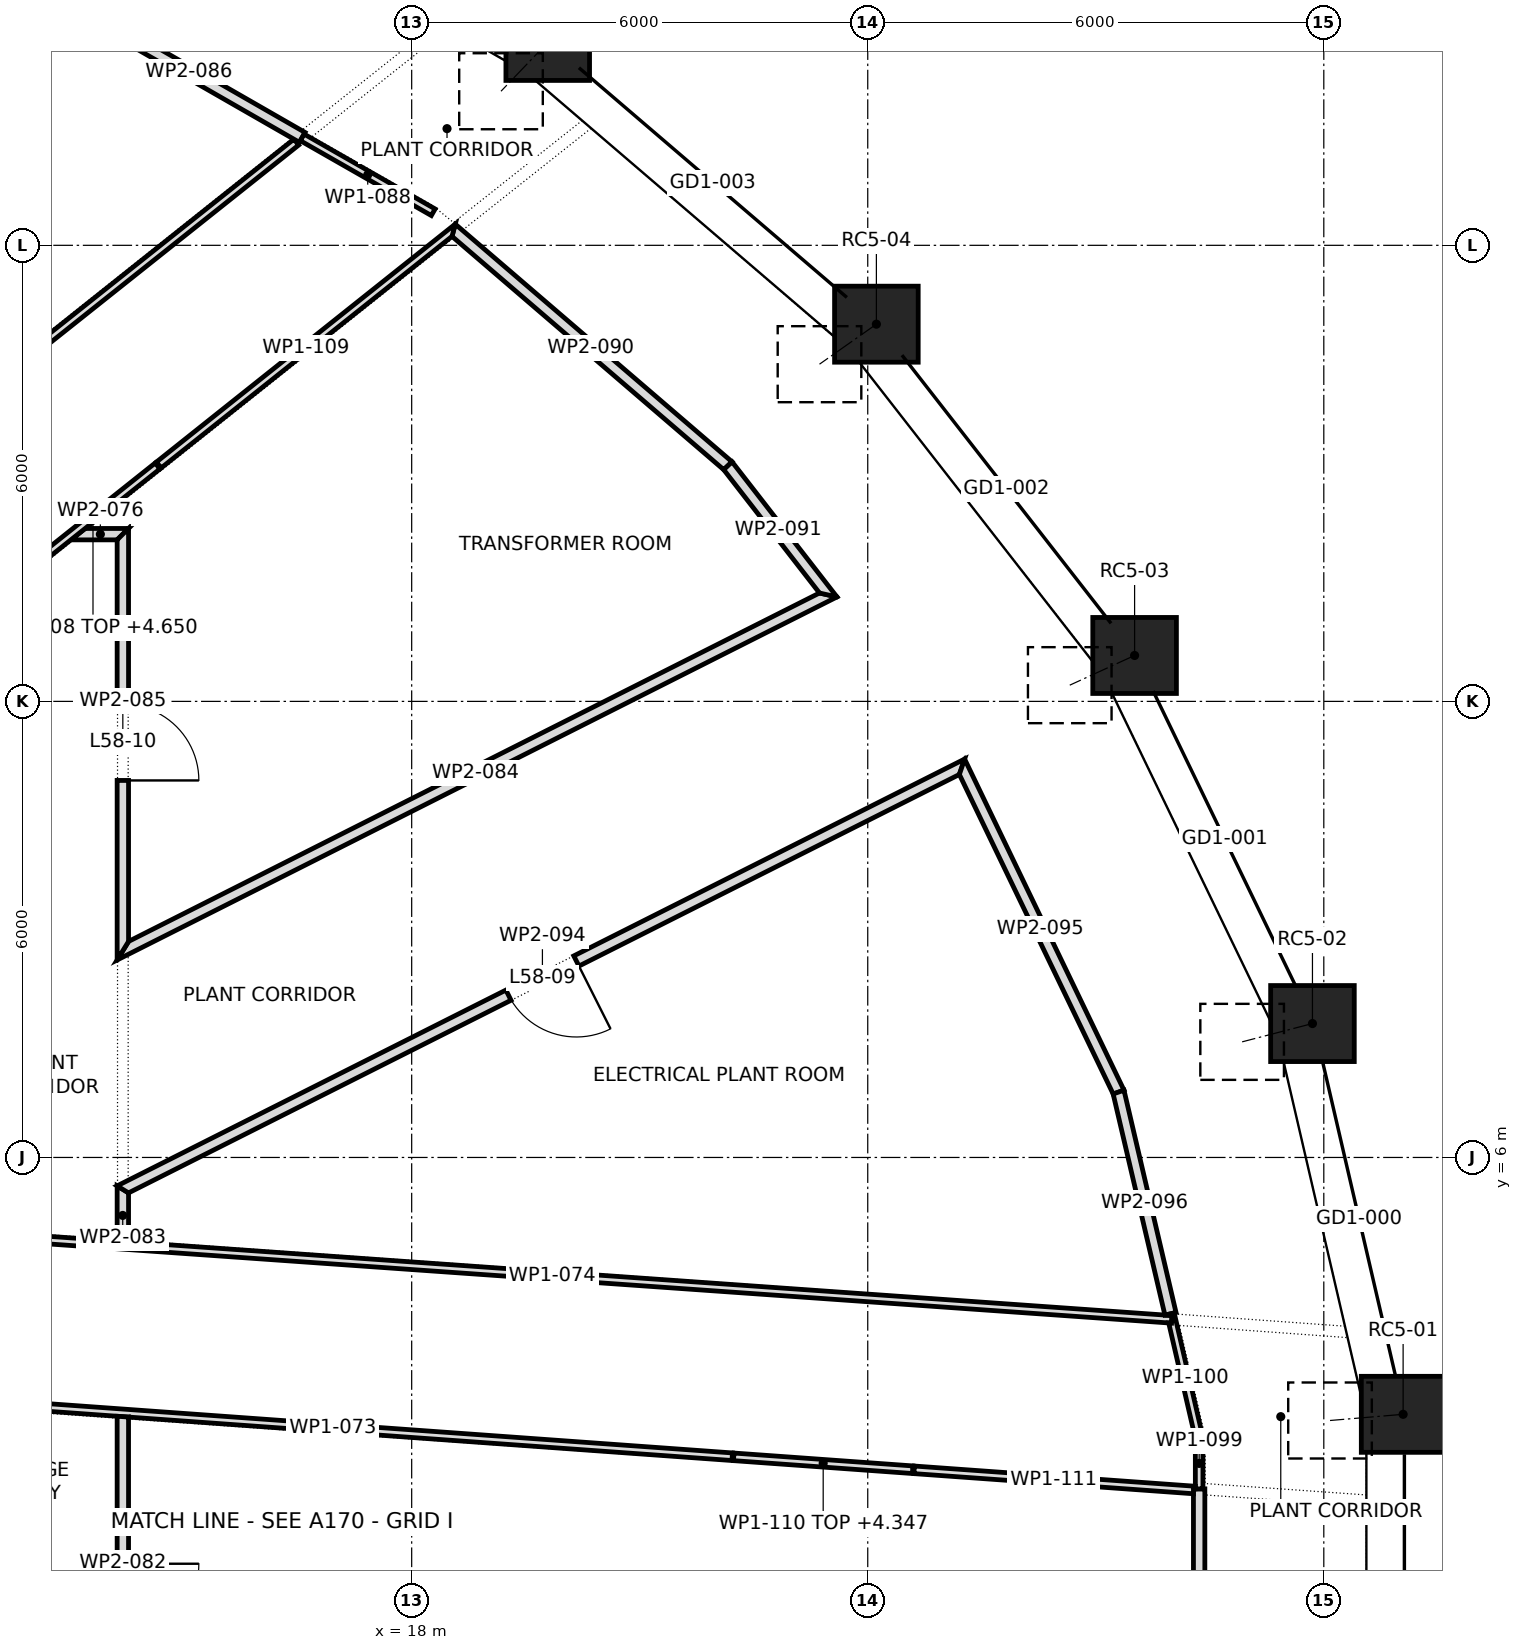
"""IFC4 building model, lengths in metres.
Left out: names, types, materials, properties, quantities, classifications, styles, units other than length and angle.
Written with IfcOpenShell. Run it as: python <this file> out.ifc"""

import sys

from ifc_helpers import new_model, si_unit, direction, frame, frame_2d, origin, origin_2d, place, context, subcontext, project, spatial, polyline, rectangle, outline, extrude, element, fill, save


model = new_model("IFC4")
c1 = context("Model", 3, precision=1e-05, world=origin(), true_north=direction((0.0, 1.0)))
c2 = subcontext(c1, "Body", "Model", "MODEL_VIEW")
j1 = project(units=[si_unit("LENGTHUNIT", "METRE"), si_unit("PLANEANGLEUNIT", "RADIAN")], contexts=[c1])
p1 = place(None, origin())
s1 = spatial("IfcSite", under=j1, at=p1, CompositionType="ELEMENT")
p2 = place(p1, origin())
s2 = spatial("IfcBuilding", under=s1, at=p2, CompositionType="ELEMENT")
p3 = place(p2, frame((0.0, 0.0, 250.9)))
s3 = spatial("IfcBuildingStorey", under=s2, at=p3, CompositionType="ELEMENT", Elevation=250.9)
p4 = place(p3, frame((31.043, 2.621, 0.091), z_axis=(-0.181191645558, -0.015271801555, 0.983329222416), x_axis=(0.083987554909, -0.996466803572, 0.0)))
e1 = element("IfcColumn", 1, at=p4, inside=s3, PredefinedType="COLUMN", context=c2, shape_type="SweptSolid", body=[
    extrude(rectangle(XDim=1.1, YDim=1.0, at=origin_2d()), origin(), (0.0, 0.0, 1.0), 5.307),
])
p5 = place(p3, frame((29.851, 7.762, 0.09), z_axis=(-0.174299234712, -0.045357362213, 0.983647541791), x_axis=(0.251839594723, -0.967768990271, 0.0)))
e2 = element("IfcColumn", 2, at=p5, inside=s3, PredefinedType="COLUMN", context=c2, shape_type="SweptSolid", body=[
    extrude(rectangle(XDim=1.1, YDim=1.0, at=origin_2d()), origin(), (0.0, 0.0, 1.0), 5.307),
])
p6 = place(p3, frame((27.511, 12.604, 0.088), z_axis=(-0.160721780276, -0.073644982891, 0.984248406572), x_axis=(0.416565116305, -0.909105881555, 0.0)))
e3 = element("IfcColumn", 3, at=p6, inside=s3, PredefinedType="COLUMN", context=c2, shape_type="SweptSolid", body=[
    extrude(rectangle(XDim=1.1, YDim=1.0, at=origin_2d()), origin(), (0.0, 0.0, 1.0), 5.307),
])
p7 = place(p3, frame((24.114, 16.962, 0.086), z_axis=(-0.14102688006, -0.099169586892, 0.985026300226), x_axis=(0.575215805529, -0.818001697473, 0.0)))
e4 = element("IfcColumn", 4, at=p7, inside=s3, PredefinedType="COLUMN", context=c2, shape_type="SweptSolid", body=[
    extrude(rectangle(XDim=1.1, YDim=1.0, at=origin_2d()), origin(), (0.0, 0.0, 1.0), 5.308),
])
p8 = place(p3, frame((19.79, 20.669, 0.083), z_axis=(-0.115812481815, -0.12096379157, 0.985877898213), x_axis=(0.722319686129, -0.691559304059, 0.0)))
e5 = element("IfcColumn", 5, at=p8, inside=s3, PredefinedType="COLUMN", context=c2, shape_type="SweptSolid", body=[
    extrude(rectangle(XDim=1.1, YDim=1.0, at=origin_2d()), origin(), (0.0, 0.0, 1.0), 5.308),
])
p9 = place(p3, frame((7.811, 12.459, 0.0), z_axis=(0.0, 0.0, 1.0), x_axis=(0.782532006264, 0.622610359031, 0.0)))
e6 = element("IfcWall", 6, at=p9, inside=s3, PredefinedType="PARTITIONING", context=c2, shape_type="SweptSolid", body=[
    extrude(outline(polyline([(11.08, 0.05), (9.234, 0.05), (7.387, 0.05), (5.54, 0.05), (3.694, 0.05), (1.847, 0.05), (0.0, 0.05), (0.1, -0.05), (1.93, -0.05), (3.76, -0.05), (5.59, -0.05), (7.42, -0.05), (9.25, -0.05), (11.08, -0.05), (11.08, 0.05)])), origin(), (0.0, 0.0, 1.0), 5.1),
])
p10 = place(p3, frame((11.7, 2.82, 0.0), z_axis=(0.0, 0.0, 1.0), x_axis=(0.997417199195, -0.071825697006, 0.0)))
e7 = element("IfcWall", 7, at=p10, inside=s3, PredefinedType="PARTITIONING", context=c2, shape_type="SweptSolid", body=[
    extrude(outline(polyline([(0.0, -0.05), (1.289, -0.05), (2.578, -0.05), (2.585, -0.05), (2.585, -0.05), (4.578, -0.05), (6.57, -0.05), (8.562, -0.05), (10.554, -0.05), (10.554, 0.05), (8.795, 0.05), (7.036, 0.05), (5.277, 0.05), (3.518, 0.05), (1.759, 0.05), (0.0, 0.05), (0.0, -0.05)])), origin(), (0.0, 0.0, 1.0), 5.1),
])
p11 = place(p3, frame((11.7, 5.02, 0.0), z_axis=(0.0, 0.0, 1.0), x_axis=(0.997521106379, -0.070367906947, 0.0)))
e8 = element("IfcWall", 8, at=p11, inside=s3, PredefinedType="PARTITIONING", context=c2, shape_type="SweptSolid", body=[
    extrude(rectangle(XDim=16.341, YDim=0.1, at=frame_2d((8.171, 0.0))), origin(), (0.0, 0.0, 1.0), 5.1),
])
p12 = place(p3, frame((13.516, 14.2, 0.0), z_axis=(0.0, 0.0, 1.0), x_axis=(1.0, 0.0, 0.0)))
e9 = element("IfcWall", 9, at=p12, inside=s3, PredefinedType="PARTITIONING", context=c2, shape_type="SweptSolid", body=[
    extrude(outline(polyline([(0.0, -0.075), (0.609, -0.075), (0.759, 0.075), (0.188, 0.075), (0.0, -0.075), (0.0, -0.075)])), origin(), (0.0, 0.0, 1.0), 5.1),
])
p13 = place(p3, frame((14.2, 2.595, 0.0), z_axis=(0.0, 0.0, 1.0), x_axis=(0.0, -1.0, 0.0)))
e10 = element("IfcWall", 10, at=p13, inside=s3, PredefinedType="PARTITIONING", context=c2, shape_type="SweptSolid", body=[
    extrude(outline(polyline([(0.0, -0.075), (1.667, -0.075), (3.335, -0.075), (5.003, -0.075), (4.945, 0.0), (4.887, 0.075), (3.262, 0.075), (1.636, 0.075), (0.01, 0.075), (0.0, -0.07), (0.0, -0.075)])), origin(), (0.0, 0.0, 1.0), 5.1),
])
p14 = place(p13, frame((1.94, 0.0, 0.0)))
e11 = element("IfcOpeningElement", 11, at=p14, cuts=e10, PredefinedType="OPENING", context=c2, shape_type="SweptSolid", body=[
    extrude(rectangle(XDim=1.0, YDim=2.1, at=frame_2d((0.5, 1.05))), frame((0.0, 0.087, 0.0), z_axis=(0.0, -1.0, 0.0), x_axis=(1.0, 0.0, 0.0)), (0.0, 0.0, 1.0), 0.174),
])
p15 = place(p3, frame((14.2, 5.626, 0.0), z_axis=(0.0, 0.0, 1.0), x_axis=(0.0, -1.0, 0.0)))
e12 = element("IfcWall", 12, at=p15, inside=s3, PredefinedType="PARTITIONING", context=c2, shape_type="SweptSolid", body=[
    extrude(outline(polyline([(0.0, -0.075), (0.727, -0.075), (0.738, 0.075), (0.092, 0.075), (0.046, 0.0), (0.0, -0.075)])), origin(), (0.0, 0.0, 1.0), 5.1),
])
p16 = place(p3, frame((14.091, 8.665, 0.0), z_axis=(0.0, 0.0, 1.0), x_axis=(0.892879606884, 0.45029546701, 0.0)))
e13 = element("IfcWall", 13, at=p16, inside=s3, PredefinedType="PARTITIONING", context=c2, shape_type="SweptSolid", body=[
    extrude(outline(polyline([(10.606, -0.075), (10.606, -0.075), (10.424, 0.075), (8.727, 0.075), (7.031, 0.075), (5.334, 0.075), (3.637, 0.075), (1.94, 0.075), (0.243, 0.075), (0.0, -0.075), (0.0, -0.075), (1.768, -0.075), (3.535, -0.075), (5.303, -0.075), (7.071, -0.075), (8.838, -0.075), (10.606, -0.075)])), origin(), (0.0, 0.0, 1.0), 5.1),
])
p17 = place(p3, frame((14.2, 14.275, 0.0), z_axis=(0.0, 0.0, 1.0), x_axis=(0.0, -1.0, 0.0)))
e14 = element("IfcWall", 14, at=p17, inside=s3, PredefinedType="PARTITIONING", context=c2, shape_type="SweptSolid", body=[
    extrude(outline(polyline([(0.15, -0.075), (1.992, -0.075), (3.834, -0.075), (5.677, -0.075), (5.433, 0.075), (3.622, 0.075), (1.811, 0.075), (0.0, 0.075), (0.15, -0.075)])), origin(), (0.0, 0.0, 1.0), 5.1),
])
p18 = place(p17, frame((2.315, 0.0, 0.0)))
e15 = element("IfcOpeningElement", 15, at=p18, cuts=e14, PredefinedType="OPENING", context=c2, shape_type="SweptSolid", body=[
    extrude(rectangle(XDim=1.0, YDim=2.1, at=frame_2d((0.5, 1.05))), frame((0.0, 0.087, 0.0), z_axis=(0.0, -1.0, 0.0), x_axis=(1.0, 0.0, 0.0)), (0.0, 0.0, 1.0), 0.174),
])
p19 = place(p3, frame((16.56, 19.42, 0.0), z_axis=(0.0, 0.0, 1.0), x_axis=(-0.867342678507, 0.497711440536, 0.0)))
e16 = element("IfcWall", 16, at=p19, inside=s3, PredefinedType="PARTITIONING", context=c2, shape_type="SweptSolid", body=[
    extrude(outline(polyline([(0.0, -0.075), (1.721, -0.075), (3.443, -0.075), (3.429, 0.075), (1.715, 0.075), (0.0, 0.075), (0.0, -0.075)])), origin(), (0.0, 0.0, 1.0), 5.1),
])
p20 = place(p3, frame((18.283, 18.435, 0.0), z_axis=(0.0, 0.0, 1.0), x_axis=(-0.868280986798, 0.496072704314, 0.0)))
e17 = element("IfcWall", 17, at=p20, inside=s3, PredefinedType="PARTITIONING", context=c2, shape_type="SweptSolid", body=[
    extrude(rectangle(XDim=1.985, YDim=0.1, at=frame_2d((0.992, 0.0))), origin(), (0.0, 0.0, 1.0), 5.1),
])
p21 = place(p3, frame((22.166, 15.095, 0.0), z_axis=(0.0, 0.0, 1.0), x_axis=(-0.758681846791, 0.651461322989, 0.0)))
e18 = element("IfcWall", 18, at=p21, inside=s3, PredefinedType="PARTITIONING", context=c2, shape_type="SweptSolid", body=[
    extrude(outline(polyline([(4.8, -0.075), (4.8, -0.075), (4.727, 0.075), (3.156, 0.075), (1.586, 0.075), (0.015, 0.075), (0.0, -0.074), (0.0, -0.075), (1.6, -0.075), (3.2, -0.075), (4.8, -0.075)])), origin(), (0.0, 0.0, 1.0), 5.1),
])
p22 = place(p3, frame((22.156, 15.106, 0.0), z_axis=(0.0, 0.0, 1.0), x_axis=(0.613279576322, -0.789865913473, 0.0)))
e19 = element("IfcWall", 19, at=p22, inside=s3, PredefinedType="PARTITIONING", context=c2, shape_type="SweptSolid", body=[
    extrude(outline(polyline([(0.015, -0.075), (2.069, -0.075), (2.251, 0.075), (2.251, 0.075), (0.0, 0.075), (0.0, 0.074), (0.015, -0.075)])), origin(), (0.0, 0.0, 1.0), 5.1),
])
p23 = place(p3, frame((25.308, 11.174, 0.0), z_axis=(0.0, 0.0, 1.0), x_axis=(-0.893124841653, -0.449808867435, 0.0)))
e20 = element("IfcWall", 20, at=p23, inside=s3, PredefinedType="PARTITIONING", context=c2, shape_type="SweptSolid", body=[
    extrude(outline(polyline([(0.0, -0.075), (1.783, -0.075), (3.567, -0.075), (5.35, -0.075), (7.133, -0.075), (8.917, -0.075), (10.7, -0.075), (12.483, -0.075), (12.391, 0.075), (10.643, 0.075), (8.894, 0.075), (7.146, 0.075), (5.398, 0.075), (3.649, 0.075), (1.901, 0.075), (0.153, 0.075), (0.0, -0.075), (0.0, -0.075)])), origin(), (0.0, 0.0, 1.0), 5.1),
])
p24 = place(p23, frame((5.757, 0.0, 0.0)))
e21 = element("IfcOpeningElement", 21, at=p24, cuts=e20, PredefinedType="OPENING", context=c2, shape_type="SweptSolid", body=[
    extrude(rectangle(XDim=1.0, YDim=2.1, at=frame_2d((0.5, 1.05))), frame((0.0, 0.087, 0.0), z_axis=(0.0, -1.0, 0.0), x_axis=(1.0, 0.0, 0.0)), (0.0, 0.0, 1.0), 0.174),
])
p25 = place(p3, frame((27.304, 6.853, 0.0), z_axis=(0.0, 0.0, 1.0), x_axis=(-0.433730590615, 0.901042604301, 0.0)))
e22 = element("IfcWall", 22, at=p25, inside=s3, PredefinedType="PARTITIONING", context=c2, shape_type="SweptSolid", body=[
    extrude(outline(polyline([(0.0, -0.075), (1.612, -0.075), (3.223, -0.075), (4.834, -0.075), (4.682, 0.075), (3.127, 0.075), (1.572, 0.075), (0.017, 0.075), (0.0, -0.075)])), origin(), (0.0, 0.0, 1.0), 5.1),
])
p26 = place(p3, frame((27.298, 6.868, 0.0), z_axis=(0.0, 0.0, 1.0), x_axis=(0.227974635616, -0.973667071188, 0.0)))
e23 = element("IfcWall", 23, at=p26, inside=s3, PredefinedType="PARTITIONING", context=c2, shape_type="SweptSolid", body=[
    extrude(outline(polyline([(0.0, 0.075), (0.0, 0.074), (0.016, -0.075), (1.51, -0.075), (3.004, -0.075), (3.004, 0.075), (1.502, 0.075), (0.0, 0.075)])), origin(), (0.0, 0.0, 1.0), 5.1),
])
p27 = place(p3, frame((28.36, -2.319, 0.0), z_axis=(0.0, 0.0, 1.0), x_axis=(0.0, 1.0, 0.0)))
e24 = element("IfcWall", 24, at=p27, inside=s3, PredefinedType="PARTITIONING", context=c2, shape_type="SweptSolid", body=[
    extrude(outline(polyline([(3.958, 0.075), (1.988, 0.075), (0.017, 0.075), (0.0, -0.074), (0.0, -0.075), (1.979, -0.075), (3.958, -0.075), (3.958, 0.075)])), origin(), (0.0, 0.0, 1.0), 5.1),
])
p28 = place(p3, frame((28.36, 1.64, 0.0), z_axis=(0.0, 0.0, 1.0), x_axis=(0.0, 1.0, 0.0)))
e25 = element("IfcWall", 25, at=p28, inside=s3, PredefinedType="PARTITIONING", context=c2, shape_type="SweptSolid", body=[
    extrude(outline(polyline([(0.676, -0.05), (0.676, -0.05), (0.664, 0.05), (0.0, 0.05), (0.0, -0.05), (0.676, -0.05)])), origin(), (0.0, 0.0, 1.0), 5.1),
])
p29 = place(p3, frame((28.361, 2.304, 0.0), z_axis=(0.0, 0.0, 1.0), x_axis=(-0.224870109073, 0.974388748932, 0.0)))
e26 = element("IfcWall", 26, at=p29, inside=s3, PredefinedType="PARTITIONING", context=c2, shape_type="SweptSolid", body=[
    extrude(outline(polyline([(1.682, -0.05), (1.682, 0.031), (1.682, 0.05), (1.674, 0.05), (1.654, -0.015), (1.559, 0.014), (1.57, 0.05), (0.011, 0.05), (0.006, 0.0), (0.0, -0.05), (0.0, -0.05), (0.0, -0.05), (1.682, -0.05)])), origin(), (0.0, 0.0, 1.0), 5.1),
])
p30 = place(p3, frame((12.95, 13.738, 0.0), z_axis=(0.0, 0.0, 1.0), x_axis=(0.782333404853, 0.622859890867, 0.0)))
e27 = element("IfcWall", 27, at=p30, inside=s3, PredefinedType="PARTITIONING", context=c2, shape_type="SweptSolid", body=[
    extrude(outline(polyline([(0.0, 0.05), (0.0, -0.05), (2.192, -0.05), (2.192, 0.05), (0.0, 0.05)])), origin(), (0.0, 0.0, 1.0), 4.65),
])
p31 = place(p3, frame((14.665, 15.104, 0.0), z_axis=(0.0, 0.0, 1.0), x_axis=(0.7823282695, 0.622866340993, 0.0)))
e28 = element("IfcWall", 28, at=p31, inside=s3, PredefinedType="PARTITIONING", context=c2, shape_type="SweptSolid", body=[
    extrude(outline(polyline([(0.0, -0.05), (1.634, -0.05), (3.268, -0.05), (4.902, -0.05), (5.036, 0.05), (3.357, 0.05), (1.678, 0.05), (0.0, 0.05), (0.0, -0.05)])), origin(), (0.0, 0.0, 1.0), 5.1),
])
p32 = place(p3, frame((22.227, 2.062, 0.0), z_axis=(0.0, 0.0, 1.0), x_axis=(0.997418974708, -0.071801036847, 0.0)))
e29 = element("IfcWall", 29, at=p32, inside=s3, PredefinedType="PARTITIONING", context=c2, shape_type="SweptSolid", body=[
    extrude(outline(polyline([(0.0, 0.05), (0.0, -0.05), (2.38, -0.05), (2.38, 0.05), (0.0, 0.05)])), origin(), (0.0, 0.0, 1.0), 4.347),
])
p33 = place(p3, frame((24.601, 1.891, 0.0), z_axis=(0.0, 0.0, 1.0), x_axis=(0.997421535465, -0.071765455408, 0.0)))
e30 = element("IfcWall", 30, at=p33, inside=s3, PredefinedType="PARTITIONING", context=c2, shape_type="SweptSolid", body=[
    extrude(outline(polyline([(0.0, -0.05), (1.849, -0.05), (3.697, -0.05), (3.693, 0.014), (3.715, 0.016), (3.715, 0.05), (1.857, 0.05), (0.0, 0.05), (0.0, -0.05)])), origin(), (0.0, 0.0, 1.0), 5.1),
])
p34 = place(p14, origin())
e31 = element("IfcDoor", 31, at=p34, inside=s3, OperationType="SINGLE_SWING_RIGHT", PredefinedType="DOOR", context=c2, shape_type="SweptSolid", body=[
    extrude(rectangle(XDim=1.0, YDim=2.1, at=frame_2d((0.5, 1.05))), frame((0.0, 0.025, 0.0), z_axis=(0.0, -1.0, 0.0), x_axis=(1.0, 0.0, 0.0)), (0.0, 0.0, 1.0), 0.05),
])
fill(e11, e31)
p35 = place(p24, origin())
e32 = element("IfcDoor", 32, at=p35, inside=s3, OperationType="SINGLE_SWING_RIGHT", PredefinedType="DOOR", context=c2, shape_type="SweptSolid", body=[
    extrude(rectangle(XDim=1.0, YDim=2.1, at=frame_2d((0.5, 1.05))), frame((0.0, 0.025, 0.0), z_axis=(0.0, -1.0, 0.0), x_axis=(1.0, 0.0, 0.0)), (0.0, 0.0, 1.0), 0.05),
])
fill(e21, e32)
p36 = place(p18, origin())
e33 = element("IfcDoor", 33, at=p36, inside=s3, OperationType="SINGLE_SWING_LEFT", PredefinedType="DOOR", context=c2, shape_type="SweptSolid", body=[
    extrude(rectangle(XDim=1.0, YDim=2.1, at=frame_2d((0.5, 1.05))), frame((0.0, 0.025, 0.0), z_axis=(0.0, -1.0, 0.0), x_axis=(1.0, 0.0, 0.0)), (0.0, 0.0, 1.0), 0.05),
])
fill(e15, e33)
save(model, sys.argv[1])
